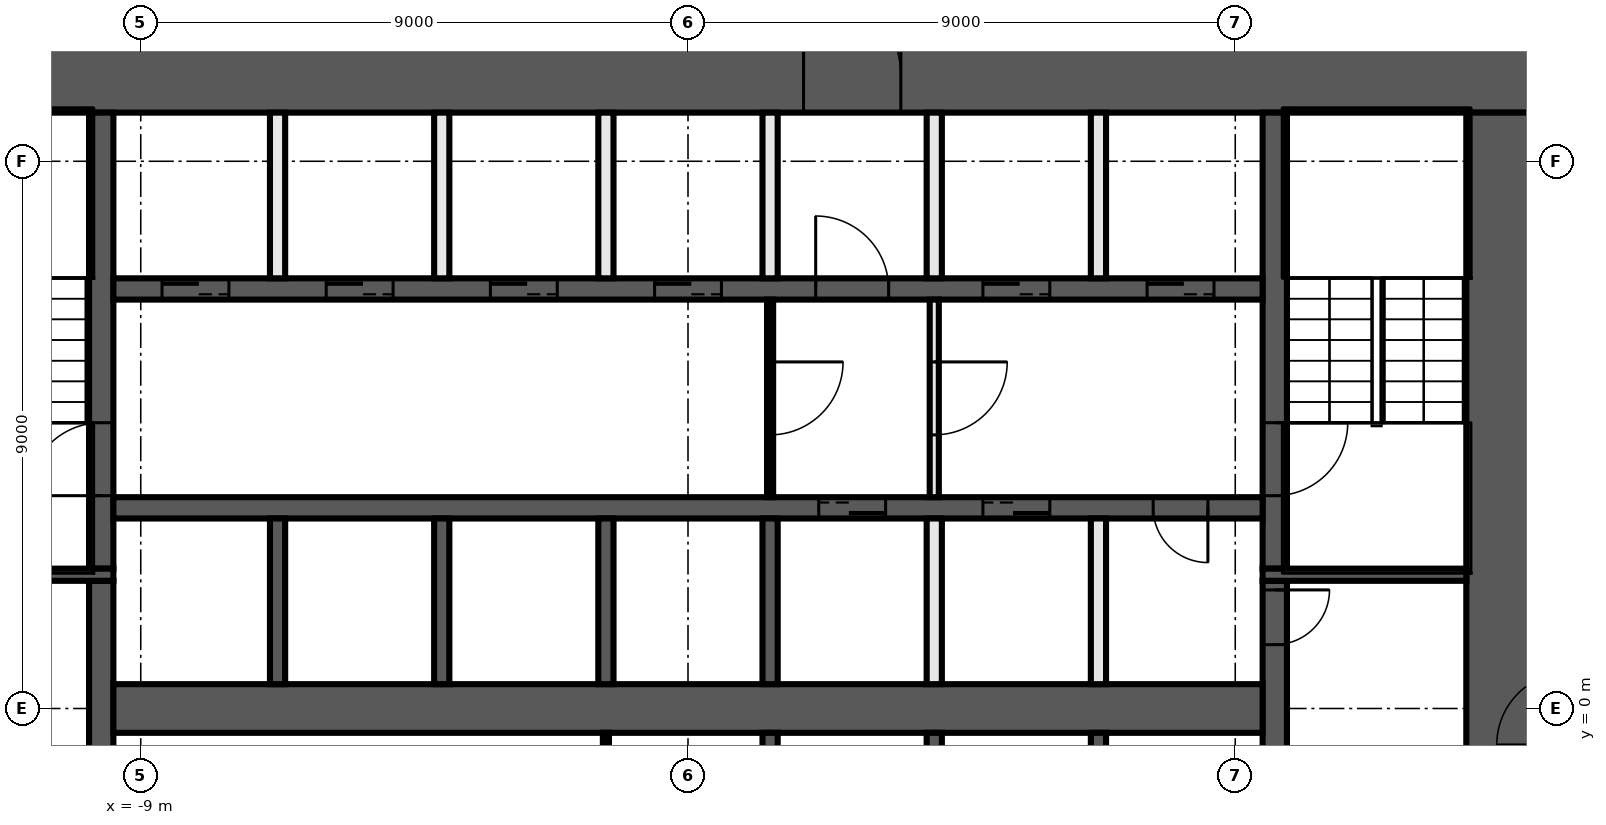
"""IFC4 building model, lengths in metres.
Left out: names, types, materials, properties, quantities, classifications, styles, units other than length and angle.
Written with IfcOpenShell. Run it as: python <this file> out.ifc"""

import sys

from ifc_helpers import new_model, si_unit, direction, frame, frame_2d, origin, place, context, subcontext, project, spatial, rectangle, extrude, element, fill, save


model = new_model("IFC4")
c1 = context("Model", 3, precision=1e-05, world=origin(), true_north=direction((0.0, 1.0)))
c2 = subcontext(c1, "Body", "Model", "MODEL_VIEW")
j1 = project(units=[si_unit("LENGTHUNIT", "METRE"), si_unit("PLANEANGLEUNIT", "RADIAN")], contexts=[c1])
p1 = place(None, origin())
s1 = spatial("IfcSite", under=j1, at=p1, CompositionType="ELEMENT")
p2 = place(p1, origin())
s2 = spatial("IfcBuilding", under=s1, at=p2, CompositionType="ELEMENT")
p3 = place(p2, frame((0.0, 0.0, -17.0)))
s3 = spatial("IfcBuildingStorey", under=s2, at=p3, CompositionType="ELEMENT", Elevation=-17.0)
p4 = place(p3, frame((-14.0, 10.4, 0.0), z_axis=(0.0, 0.0, 1.0), x_axis=(1.0, 0.0, 0.0)))
e1 = element("IfcWall", 1, at=p4, inside=s3, PredefinedType="SHEAR", context=c2, shape_type="SweptSolid", body=[
    extrude(rectangle(XDim=28.0, YDim=1.2, at=frame_2d((14.0, 0.0))), origin(), (0.0, 0.0, 1.0), 5.1),
])
p5 = place(p4, frame((15.9, 0.0, 0.0)))
e2 = element("IfcOpeningElement", 2, at=p5, cuts=e1, PredefinedType="OPENING", context=c2, shape_type="SweptSolid", body=[
    extrude(rectangle(XDim=1.6, YDim=2.1, at=frame_2d((0.8, 1.05))), frame((0.0, 0.61, 0.0), z_axis=(0.0, -1.0, 0.0), x_axis=(1.0, 0.0, 0.0)), (0.0, 0.0, 1.0), 1.22),
])
p6 = place(p3, frame((13.4, 9.8, 0.0), z_axis=(0.0, 0.0, 1.0), x_axis=(0.0, -1.0, 0.0)))
e3 = element("IfcWall", 3, at=p6, inside=s3, PredefinedType="SHEAR", context=c2, shape_type="SweptSolid", body=[
    extrude(rectangle(XDim=19.6, YDim=1.2, at=frame_2d((9.8, 0.0))), origin(), (0.0, 0.0, 1.0), 5.1),
])
p7 = place(p3, frame((9.65, 2.1, 0.0), z_axis=(0.0, 0.0, 1.0), x_axis=(0.0, -1.0, 0.0)))
e4 = element("IfcWall", 4, at=p7, inside=s3, PredefinedType="SHEAR", context=c2, shape_type="SweptSolid", body=[
    extrude(rectangle(XDim=4.2, YDim=0.4, at=frame_2d((2.1, 0.0))), origin(), (0.0, 0.0, 1.0), 5.1),
])
p8 = place(p7, frame((0.15, 0.0, 0.0)))
e5 = element("IfcOpeningElement", 5, at=p8, cuts=e4, PredefinedType="OPENING", context=c2, shape_type="SweptSolid", body=[
    extrude(rectangle(XDim=0.9, YDim=2.1, at=frame_2d((0.45, 1.05))), frame((0.0, 0.21, 0.0), z_axis=(0.0, -1.0, 0.0), x_axis=(1.0, 0.0, 0.0)), (0.0, 0.0, 1.0), 0.42),
])
p9 = place(p3, frame((9.65, 9.8, 0.0), z_axis=(0.0, 0.0, 1.0), x_axis=(0.0, -1.0, 0.0)))
e6 = element("IfcWall", 6, at=p9, inside=s3, PredefinedType="SHEAR", context=c2, shape_type="SweptSolid", body=[
    extrude(rectangle(XDim=7.5, YDim=0.4, at=frame_2d((3.75, 0.0))), origin(), (0.0, 0.0, 1.0), 5.1),
])
p10 = place(p9, frame((5.1, 0.0, 0.0)))
e7 = element("IfcOpeningElement", 7, at=p10, cuts=e6, PredefinedType="OPENING", context=c2, shape_type="SweptSolid", body=[
    extrude(rectangle(XDim=1.2, YDim=2.1, at=frame_2d((0.6, 1.05))), frame((0.0, 0.21, 0.0), z_axis=(0.0, -1.0, 0.0), x_axis=(1.0, 0.0, 0.0)), (0.0, 0.0, 1.0), 0.42),
])
p11 = place(p3, frame((-9.65, -2.1, 0.0), z_axis=(0.0, 0.0, 1.0), x_axis=(0.0, 1.0, 0.0)))
e8 = element("IfcWall", 8, at=p11, inside=s3, PredefinedType="SHEAR", context=c2, shape_type="SweptSolid", body=[
    extrude(rectangle(XDim=4.2, YDim=0.4, at=frame_2d((2.1, 0.0))), origin(), (0.0, 0.0, 1.0), 5.1),
])
p12 = place(p3, frame((-9.65, 2.3, 0.0), z_axis=(0.0, 0.0, 1.0), x_axis=(0.0, 1.0, 0.0)))
e9 = element("IfcWall", 9, at=p12, inside=s3, PredefinedType="SHEAR", context=c2, shape_type="SweptSolid", body=[
    extrude(rectangle(XDim=7.5, YDim=0.4, at=frame_2d((3.75, 0.0))), origin(), (0.0, 0.0, 1.0), 5.1),
])
p13 = place(p12, frame((1.2, 0.0, 0.0)))
e10 = element("IfcOpeningElement", 10, at=p13, cuts=e9, PredefinedType="OPENING", context=c2, shape_type="SweptSolid", body=[
    extrude(rectangle(XDim=1.2, YDim=2.1, at=frame_2d((0.6, 1.05))), frame((0.0, 0.21, 0.0), z_axis=(0.0, -1.0, 0.0), x_axis=(1.0, 0.0, 0.0)), (0.0, 0.0, 1.0), 0.42),
])
for number, where, z_axis, x_axis in (
    (11, (9.45, 2.2, 0.0), (0.0, 0.0, 1.0), (1.0, 0.0, 0.0)),
    (12, (-9.45, 2.2, 0.0), (0.0, 0.0, 1.0), (-1.0, 0.0, 0.0)),
):
    element("IfcWall", number, at=place(p3, frame(where, z_axis=z_axis, x_axis=x_axis)), inside=s3, PredefinedType="SHEAR", context=c2, shape_type="SweptSolid", body=[
        extrude(rectangle(XDim=3.35, YDim=0.2, at=frame_2d((1.675, 0.0))), origin(), (0.0, 0.0, 1.0), 5.1),
    ])
p14 = place(p3, frame((-9.45, 6.9, 0.0), z_axis=(0.0, 0.0, 1.0), x_axis=(1.0, 0.0, 0.0)))
e13 = element("IfcWall", 13, at=p14, inside=s3, PredefinedType="SHEAR", context=c2, shape_type="SweptSolid", body=[
    extrude(rectangle(XDim=18.9, YDim=0.35, at=frame_2d((9.45, 0.0))), origin(), (0.0, 0.0, 1.0), 5.1),
])
p15 = place(p14, frame((0.8, 0.0, 0.0)))
e14 = element("IfcOpeningElement", 14, at=p15, cuts=e13, PredefinedType="OPENING", context=c2, shape_type="SweptSolid", body=[
    extrude(rectangle(XDim=1.1, YDim=2.1, at=frame_2d((0.55, 1.05))), frame((0.0, 0.185, 0.0), z_axis=(0.0, -1.0, 0.0), x_axis=(1.0, 0.0, 0.0)), (0.0, 0.0, 1.0), 0.37),
])
p16 = place(p14, frame((3.5, 0.0, 0.0)))
e15 = element("IfcOpeningElement", 15, at=p16, cuts=e13, PredefinedType="OPENING", context=c2, shape_type="SweptSolid", body=[
    extrude(rectangle(XDim=1.1, YDim=2.1, at=frame_2d((0.55, 1.05))), frame((0.0, 0.185, 0.0), z_axis=(0.0, -1.0, 0.0), x_axis=(1.0, 0.0, 0.0)), (0.0, 0.0, 1.0), 0.37),
])
p17 = place(p14, frame((6.2, 0.0, 0.0)))
e16 = element("IfcOpeningElement", 16, at=p17, cuts=e13, PredefinedType="OPENING", context=c2, shape_type="SweptSolid", body=[
    extrude(rectangle(XDim=1.1, YDim=2.1, at=frame_2d((0.55, 1.05))), frame((0.0, 0.185, 0.0), z_axis=(0.0, -1.0, 0.0), x_axis=(1.0, 0.0, 0.0)), (0.0, 0.0, 1.0), 0.37),
])
p18 = place(p14, frame((8.9, 0.0, 0.0)))
e17 = element("IfcOpeningElement", 17, at=p18, cuts=e13, PredefinedType="OPENING", context=c2, shape_type="SweptSolid", body=[
    extrude(rectangle(XDim=1.1, YDim=2.1, at=frame_2d((0.55, 1.05))), frame((0.0, 0.185, 0.0), z_axis=(0.0, -1.0, 0.0), x_axis=(1.0, 0.0, 0.0)), (0.0, 0.0, 1.0), 0.37),
])
p19 = place(p14, frame((11.55, 0.0, 0.0)))
e18 = element("IfcOpeningElement", 18, at=p19, cuts=e13, PredefinedType="OPENING", context=c2, shape_type="SweptSolid", body=[
    extrude(rectangle(XDim=1.2, YDim=2.1, at=frame_2d((0.6, 1.05))), frame((0.0, 0.185, 0.0), z_axis=(0.0, -1.0, 0.0), x_axis=(1.0, 0.0, 0.0)), (0.0, 0.0, 1.0), 0.37),
])
p20 = place(p14, frame((14.3, 0.0, 0.0)))
e19 = element("IfcOpeningElement", 19, at=p20, cuts=e13, PredefinedType="OPENING", context=c2, shape_type="SweptSolid", body=[
    extrude(rectangle(XDim=1.1, YDim=2.1, at=frame_2d((0.55, 1.05))), frame((0.0, 0.185, 0.0), z_axis=(0.0, -1.0, 0.0), x_axis=(1.0, 0.0, 0.0)), (0.0, 0.0, 1.0), 0.37),
])
p21 = place(p14, frame((17.0, 0.0, 0.0)))
e20 = element("IfcOpeningElement", 20, at=p21, cuts=e13, PredefinedType="OPENING", context=c2, shape_type="SweptSolid", body=[
    extrude(rectangle(XDim=1.1, YDim=2.1, at=frame_2d((0.55, 1.05))), frame((0.0, 0.185, 0.0), z_axis=(0.0, -1.0, 0.0), x_axis=(1.0, 0.0, 0.0)), (0.0, 0.0, 1.0), 0.37),
])
p22 = place(p3, frame((9.45, 3.3, 0.0), z_axis=(0.0, 0.0, 1.0), x_axis=(-1.0, 0.0, 0.0)))
e21 = element("IfcWall", 21, at=p22, inside=s3, PredefinedType="SHEAR", context=c2, shape_type="SweptSolid", body=[
    extrude(rectangle(XDim=18.9, YDim=0.35, at=frame_2d((9.45, 0.0))), origin(), (0.0, 0.0, 1.0), 5.1),
])
p23 = place(p22, frame((6.2, 0.0, 0.0)))
e22 = element("IfcOpeningElement", 22, at=p23, cuts=e21, PredefinedType="OPENING", context=c2, shape_type="SweptSolid", body=[
    extrude(rectangle(XDim=1.1, YDim=2.1, at=frame_2d((0.55, 1.05))), frame((0.0, 0.185, 0.0), z_axis=(0.0, -1.0, 0.0), x_axis=(1.0, 0.0, 0.0)), (0.0, 0.0, 1.0), 0.37),
])
p24 = place(p22, frame((3.5, 0.0, 0.0)))
e23 = element("IfcOpeningElement", 23, at=p24, cuts=e21, PredefinedType="OPENING", context=c2, shape_type="SweptSolid", body=[
    extrude(rectangle(XDim=1.1, YDim=2.1, at=frame_2d((0.55, 1.05))), frame((0.0, 0.185, 0.0), z_axis=(0.0, -1.0, 0.0), x_axis=(1.0, 0.0, 0.0)), (0.0, 0.0, 1.0), 0.37),
])
p25 = place(p22, frame((0.9, 0.0, 0.0)))
e24 = element("IfcOpeningElement", 24, at=p25, cuts=e21, PredefinedType="OPENING", context=c2, shape_type="SweptSolid", body=[
    extrude(rectangle(XDim=0.9, YDim=2.1, at=frame_2d((0.45, 1.05))), frame((0.0, 0.185, 0.0), z_axis=(0.0, -1.0, 0.0), x_axis=(1.0, 0.0, 0.0)), (0.0, 0.0, 1.0), 0.37),
])
p26 = place(p3, frame((-9.45, 0.0, 0.0), z_axis=(0.0, 0.0, 1.0), x_axis=(1.0, 0.0, 0.0)))
e25 = element("IfcWall", 25, at=p26, inside=s3, PredefinedType="SHEAR", context=c2, shape_type="SweptSolid", body=[
    extrude(rectangle(XDim=18.9, YDim=0.8, at=frame_2d((9.45, 0.0))), origin(), (0.0, 0.0, 1.0), 5.1),
])
p27 = place(p3, frame((6.75, -3.125, 0.0), z_axis=(0.0, 0.0, 1.0), x_axis=(0.0, 1.0, 0.0)))
e26 = element("IfcWall", 26, at=p27, inside=s3, PredefinedType="SHEAR", context=c2, shape_type="SweptSolid", body=[
    extrude(rectangle(XDim=2.725, YDim=0.25, at=frame_2d((1.363, 0.0))), origin(), (0.0, 0.0, 1.0), 5.1),
])
for number, where, z_axis, x_axis in (
    (27, (6.75, 0.4, 0.0), (0.0, 0.0, 1.0), (0.0, 1.0, 0.0)),
    (28, (6.75, 7.075, 0.0), (0.0, 0.0, 1.0), (0.0, 1.0, 0.0)),
):
    element("IfcWall", number, at=place(p3, frame(where, z_axis=z_axis, x_axis=x_axis)), inside=s3, PredefinedType="SOLIDWALL", context=c2, shape_type="SweptSolid", body=[
        extrude(rectangle(XDim=2.725, YDim=0.25, at=frame_2d((1.363, 0.0))), origin(), (0.0, 0.0, 1.0), 5.1),
    ])
p28 = place(p3, frame((4.05, 6.725, 0.0), z_axis=(0.0, 0.0, 1.0), x_axis=(0.0, -1.0, 0.0)))
e29 = element("IfcWall", 29, at=p28, inside=s3, PredefinedType="PARTITIONING", context=c2, shape_type="SweptSolid", body=[
    extrude(rectangle(XDim=3.25, YDim=0.15, at=frame_2d((1.625, 0.0))), origin(), (0.0, 0.0, 1.0), 5.1),
])
p29 = place(p28, frame((1.025, 0.0, 0.0)))
e30 = element("IfcOpeningElement", 30, at=p29, cuts=e29, PredefinedType="OPENING", context=c2, shape_type="SweptSolid", body=[
    extrude(rectangle(XDim=1.2, YDim=2.1, at=frame_2d((0.6, 1.05))), frame((0.0, 0.085, 0.0), z_axis=(0.0, -1.0, 0.0), x_axis=(1.0, 0.0, 0.0)), (0.0, 0.0, 1.0), 0.17),
])
p30 = place(p3, frame((4.05, -3.125, 0.0), z_axis=(0.0, 0.0, 1.0), x_axis=(0.0, 1.0, 0.0)))
e31 = element("IfcWall", 31, at=p30, inside=s3, PredefinedType="SHEAR", context=c2, shape_type="SweptSolid", body=[
    extrude(rectangle(XDim=2.725, YDim=0.25, at=frame_2d((1.363, 0.0))), origin(), (0.0, 0.0, 1.0), 5.1),
])
for number, where, z_axis, x_axis in (
    (32, (4.05, 0.4, 0.0), (0.0, 0.0, 1.0), (0.0, 1.0, 0.0)),
    (33, (4.05, 7.075, 0.0), (0.0, 0.0, 1.0), (0.0, 1.0, 0.0)),
):
    element("IfcWall", number, at=place(p3, frame(where, z_axis=z_axis, x_axis=x_axis)), inside=s3, PredefinedType="SOLIDWALL", context=c2, shape_type="SweptSolid", body=[
        extrude(rectangle(XDim=2.725, YDim=0.25, at=frame_2d((1.363, 0.0))), origin(), (0.0, 0.0, 1.0), 5.1),
    ])
p31 = place(p3, frame((1.35, 6.725, 0.0), z_axis=(0.0, 0.0, 1.0), x_axis=(0.0, -1.0, 0.0)))
e34 = element("IfcWall", 34, at=p31, inside=s3, PredefinedType="PARTITIONING", context=c2, shape_type="SweptSolid", body=[
    extrude(rectangle(XDim=3.25, YDim=0.1, at=frame_2d((1.625, 0.0))), origin(), (0.0, 0.0, 1.0), 5.1),
])
p32 = place(p31, frame((1.025, 0.0, 0.0)))
e35 = element("IfcOpeningElement", 35, at=p32, cuts=e34, PredefinedType="OPENING", context=c2, shape_type="SweptSolid", body=[
    extrude(rectangle(XDim=1.2, YDim=2.1, at=frame_2d((0.6, 1.05))), frame((0.0, 0.06, 0.0), z_axis=(0.0, -1.0, 0.0), x_axis=(1.0, 0.0, 0.0)), (0.0, 0.0, 1.0), 0.12),
])
for number, where, z_axis, x_axis in (
    (36, (1.35, -3.125, 0.0), (0.0, 0.0, 1.0), (0.0, 1.0, 0.0)),
    (37, (1.35, 0.4, 0.0), (0.0, 0.0, 1.0), (0.0, 1.0, 0.0)),
):
    element("IfcWall", number, at=place(p3, frame(where, z_axis=z_axis, x_axis=x_axis)), inside=s3, PredefinedType="SHEAR", context=c2, shape_type="SweptSolid", body=[
        extrude(rectangle(XDim=2.725, YDim=0.25, at=frame_2d((1.363, 0.0))), origin(), (0.0, 0.0, 1.0), 5.1),
    ])
p33 = place(p3, frame((1.35, 7.075, 0.0), z_axis=(0.0, 0.0, 1.0), x_axis=(0.0, 1.0, 0.0)))
e38 = element("IfcWall", 38, at=p33, inside=s3, PredefinedType="SOLIDWALL", context=c2, shape_type="SweptSolid", body=[
    extrude(rectangle(XDim=2.725, YDim=0.25, at=frame_2d((1.363, 0.0))), origin(), (0.0, 0.0, 1.0), 5.1),
])
p34 = place(p3, frame((-1.35, -3.125, 0.0), z_axis=(0.0, 0.0, 1.0), x_axis=(0.0, 1.0, 0.0)))
e39 = element("IfcWall", 39, at=p34, inside=s3, PredefinedType="PARTITIONING", context=c2, shape_type="SweptSolid", body=[
    extrude(rectangle(XDim=2.725, YDim=0.1, at=frame_2d((1.363, 0.0))), origin(), (0.0, 0.0, 1.0), 5.1),
])
p35 = place(p3, frame((-1.35, 0.4, 0.0), z_axis=(0.0, 0.0, 1.0), x_axis=(0.0, 1.0, 0.0)))
e40 = element("IfcWall", 40, at=p35, inside=s3, PredefinedType="SHEAR", context=c2, shape_type="SweptSolid", body=[
    extrude(rectangle(XDim=2.725, YDim=0.25, at=frame_2d((1.363, 0.0))), origin(), (0.0, 0.0, 1.0), 5.1),
])
p36 = place(p3, frame((-1.35, 7.075, 0.0), z_axis=(0.0, 0.0, 1.0), x_axis=(0.0, 1.0, 0.0)))
e41 = element("IfcWall", 41, at=p36, inside=s3, PredefinedType="SOLIDWALL", context=c2, shape_type="SweptSolid", body=[
    extrude(rectangle(XDim=2.725, YDim=0.25, at=frame_2d((1.363, 0.0))), origin(), (0.0, 0.0, 1.0), 5.1),
])
p37 = place(p3, frame((-4.05, 0.4, 0.0), z_axis=(0.0, 0.0, 1.0), x_axis=(0.0, 1.0, 0.0)))
e42 = element("IfcWall", 42, at=p37, inside=s3, PredefinedType="SHEAR", context=c2, shape_type="SweptSolid", body=[
    extrude(rectangle(XDim=2.725, YDim=0.25, at=frame_2d((1.363, 0.0))), origin(), (0.0, 0.0, 1.0), 5.1),
])
p38 = place(p3, frame((-4.05, 7.075, 0.0), z_axis=(0.0, 0.0, 1.0), x_axis=(0.0, 1.0, 0.0)))
e43 = element("IfcWall", 43, at=p38, inside=s3, PredefinedType="SOLIDWALL", context=c2, shape_type="SweptSolid", body=[
    extrude(rectangle(XDim=2.725, YDim=0.25, at=frame_2d((1.363, 0.0))), origin(), (0.0, 0.0, 1.0), 5.1),
])
p39 = place(p3, frame((-6.75, 0.4, 0.0), z_axis=(0.0, 0.0, 1.0), x_axis=(0.0, 1.0, 0.0)))
e44 = element("IfcWall", 44, at=p39, inside=s3, PredefinedType="SHEAR", context=c2, shape_type="SweptSolid", body=[
    extrude(rectangle(XDim=2.725, YDim=0.25, at=frame_2d((1.363, 0.0))), origin(), (0.0, 0.0, 1.0), 5.1),
])
p40 = place(p3, frame((-6.75, 7.075, 0.0), z_axis=(0.0, 0.0, 1.0), x_axis=(0.0, 1.0, 0.0)))
e45 = element("IfcWall", 45, at=p40, inside=s3, PredefinedType="SOLIDWALL", context=c2, shape_type="SweptSolid", body=[
    extrude(rectangle(XDim=2.725, YDim=0.25, at=frame_2d((1.363, 0.0))), origin(), (0.0, 0.0, 1.0), 5.1),
])
p41 = place(p8, origin())
e46 = element("IfcDoor", 46, at=p41, inside=s3, OperationType="SINGLE_SWING_RIGHT", PredefinedType="DOOR", context=c2, shape_type="SweptSolid", body=[
    extrude(rectangle(XDim=0.9, YDim=2.1, at=frame_2d((0.45, 1.05))), frame((0.0, 0.025, 0.0), z_axis=(0.0, -1.0, 0.0), x_axis=(1.0, 0.0, 0.0)), (0.0, 0.0, 1.0), 0.05),
])
fill(e5, e46)
p42 = place(p15, origin())
e47 = element("IfcDoor", 47, at=p42, inside=s3, OperationType="DOUBLE_DOOR_SLIDING", PredefinedType="DOOR", context=c2, shape_type="SweptSolid", body=[
    extrude(rectangle(XDim=1.1, YDim=2.1, at=frame_2d((0.55, 1.05))), frame((0.0, 0.025, 0.0), z_axis=(0.0, -1.0, 0.0), x_axis=(1.0, 0.0, 0.0)), (0.0, 0.0, 1.0), 0.05),
])
fill(e14, e47)
p43 = place(p16, origin())
e48 = element("IfcDoor", 48, at=p43, inside=s3, OperationType="DOUBLE_DOOR_SLIDING", PredefinedType="DOOR", context=c2, shape_type="SweptSolid", body=[
    extrude(rectangle(XDim=1.1, YDim=2.1, at=frame_2d((0.55, 1.05))), frame((0.0, 0.025, 0.0), z_axis=(0.0, -1.0, 0.0), x_axis=(1.0, 0.0, 0.0)), (0.0, 0.0, 1.0), 0.05),
])
fill(e15, e48)
p44 = place(p17, origin())
e49 = element("IfcDoor", 49, at=p44, inside=s3, OperationType="DOUBLE_DOOR_SLIDING", PredefinedType="DOOR", context=c2, shape_type="SweptSolid", body=[
    extrude(rectangle(XDim=1.1, YDim=2.1, at=frame_2d((0.55, 1.05))), frame((0.0, 0.025, 0.0), z_axis=(0.0, -1.0, 0.0), x_axis=(1.0, 0.0, 0.0)), (0.0, 0.0, 1.0), 0.05),
])
fill(e16, e49)
p45 = place(p18, origin())
e50 = element("IfcDoor", 50, at=p45, inside=s3, OperationType="DOUBLE_DOOR_SLIDING", PredefinedType="DOOR", context=c2, shape_type="SweptSolid", body=[
    extrude(rectangle(XDim=1.1, YDim=2.1, at=frame_2d((0.55, 1.05))), frame((0.0, 0.025, 0.0), z_axis=(0.0, -1.0, 0.0), x_axis=(1.0, 0.0, 0.0)), (0.0, 0.0, 1.0), 0.05),
])
fill(e17, e50)
p46 = place(p5, origin())
e51 = element("IfcDoor", 51, at=p46, inside=s3, OperationType="DOUBLE_DOOR_SINGLE_SWING", PredefinedType="DOOR", context=c2, shape_type="SweptSolid", body=[
    extrude(rectangle(XDim=1.6, YDim=2.1, at=frame_2d((0.8, 1.05))), frame((0.0, 0.025, 0.0), z_axis=(0.0, -1.0, 0.0), x_axis=(1.0, 0.0, 0.0)), (0.0, 0.0, 1.0), 0.05),
])
fill(e2, e51)
p47 = place(p19, origin())
e52 = element("IfcDoor", 52, at=p47, inside=s3, OperationType="SINGLE_SWING_LEFT", PredefinedType="DOOR", context=c2, shape_type="SweptSolid", body=[
    extrude(rectangle(XDim=1.2, YDim=2.1, at=frame_2d((0.6, 1.05))), frame((0.0, 0.025, 0.0), z_axis=(0.0, -1.0, 0.0), x_axis=(1.0, 0.0, 0.0)), (0.0, 0.0, 1.0), 0.05),
])
fill(e18, e52)
p48 = place(p20, origin())
e53 = element("IfcDoor", 53, at=p48, inside=s3, OperationType="DOUBLE_DOOR_SLIDING", PredefinedType="DOOR", context=c2, shape_type="SweptSolid", body=[
    extrude(rectangle(XDim=1.1, YDim=2.1, at=frame_2d((0.55, 1.05))), frame((0.0, 0.025, 0.0), z_axis=(0.0, -1.0, 0.0), x_axis=(1.0, 0.0, 0.0)), (0.0, 0.0, 1.0), 0.05),
])
fill(e19, e53)
p49 = place(p21, origin())
e54 = element("IfcDoor", 54, at=p49, inside=s3, OperationType="DOUBLE_DOOR_SLIDING", PredefinedType="DOOR", context=c2, shape_type="SweptSolid", body=[
    extrude(rectangle(XDim=1.1, YDim=2.1, at=frame_2d((0.55, 1.05))), frame((0.0, 0.025, 0.0), z_axis=(0.0, -1.0, 0.0), x_axis=(1.0, 0.0, 0.0)), (0.0, 0.0, 1.0), 0.05),
])
fill(e20, e54)
p50 = place(p23, origin())
e55 = element("IfcDoor", 55, at=p50, inside=s3, OperationType="DOUBLE_DOOR_SLIDING", PredefinedType="DOOR", context=c2, shape_type="SweptSolid", body=[
    extrude(rectangle(XDim=1.1, YDim=2.1, at=frame_2d((0.55, 1.05))), frame((0.0, 0.025, 0.0), z_axis=(0.0, -1.0, 0.0), x_axis=(1.0, 0.0, 0.0)), (0.0, 0.0, 1.0), 0.05),
])
fill(e22, e55)
p51 = place(p24, origin())
e56 = element("IfcDoor", 56, at=p51, inside=s3, OperationType="DOUBLE_DOOR_SLIDING", PredefinedType="DOOR", context=c2, shape_type="SweptSolid", body=[
    extrude(rectangle(XDim=1.1, YDim=2.1, at=frame_2d((0.55, 1.05))), frame((0.0, 0.025, 0.0), z_axis=(0.0, -1.0, 0.0), x_axis=(1.0, 0.0, 0.0)), (0.0, 0.0, 1.0), 0.05),
])
fill(e23, e56)
p52 = place(p25, origin())
e57 = element("IfcDoor", 57, at=p52, inside=s3, OperationType="SINGLE_SWING_LEFT", PredefinedType="DOOR", context=c2, shape_type="SweptSolid", body=[
    extrude(rectangle(XDim=0.9, YDim=2.1, at=frame_2d((0.45, 1.05))), frame((0.0, 0.025, 0.0), z_axis=(0.0, -1.0, 0.0), x_axis=(1.0, 0.0, 0.0)), (0.0, 0.0, 1.0), 0.05),
])
fill(e24, e57)
p53 = place(p10, origin())
e58 = element("IfcDoor", 58, at=p53, inside=s3, OperationType="SINGLE_SWING_LEFT", PredefinedType="DOOR", context=c2, shape_type="SweptSolid", body=[
    extrude(rectangle(XDim=1.2, YDim=2.1, at=frame_2d((0.6, 1.05))), frame((0.0, 0.025, 0.0), z_axis=(0.0, -1.0, 0.0), x_axis=(1.0, 0.0, 0.0)), (0.0, 0.0, 1.0), 0.05),
])
fill(e7, e58)
p54 = place(p13, origin())
e59 = element("IfcDoor", 59, at=p54, inside=s3, OperationType="SINGLE_SWING_RIGHT", PredefinedType="DOOR", context=c2, shape_type="SweptSolid", body=[
    extrude(rectangle(XDim=1.2, YDim=2.1, at=frame_2d((0.6, 1.05))), frame((0.0, 0.025, 0.0), z_axis=(0.0, -1.0, 0.0), x_axis=(1.0, 0.0, 0.0)), (0.0, 0.0, 1.0), 0.05),
])
fill(e10, e59)
p55 = place(p32, origin())
e60 = element("IfcDoor", 60, at=p55, inside=s3, OperationType="SINGLE_SWING_LEFT", PredefinedType="DOOR", context=c2, shape_type="SweptSolid", body=[
    extrude(rectangle(XDim=1.2, YDim=2.1, at=frame_2d((0.6, 1.05))), frame((0.0, 0.025, 0.0), z_axis=(0.0, -1.0, 0.0), x_axis=(1.0, 0.0, 0.0)), (0.0, 0.0, 1.0), 0.05),
])
fill(e35, e60)
p56 = place(p29, origin())
e61 = element("IfcDoor", 61, at=p56, inside=s3, OperationType="SINGLE_SWING_RIGHT", PredefinedType="DOOR", context=c2, shape_type="SweptSolid", body=[
    extrude(rectangle(XDim=1.2, YDim=2.1, at=frame_2d((0.6, 1.05))), frame((0.0, 0.025, 0.0), z_axis=(0.0, -1.0, 0.0), x_axis=(1.0, 0.0, 0.0)), (0.0, 0.0, 1.0), 0.05),
])
fill(e30, e61)
save(model, sys.argv[1])
